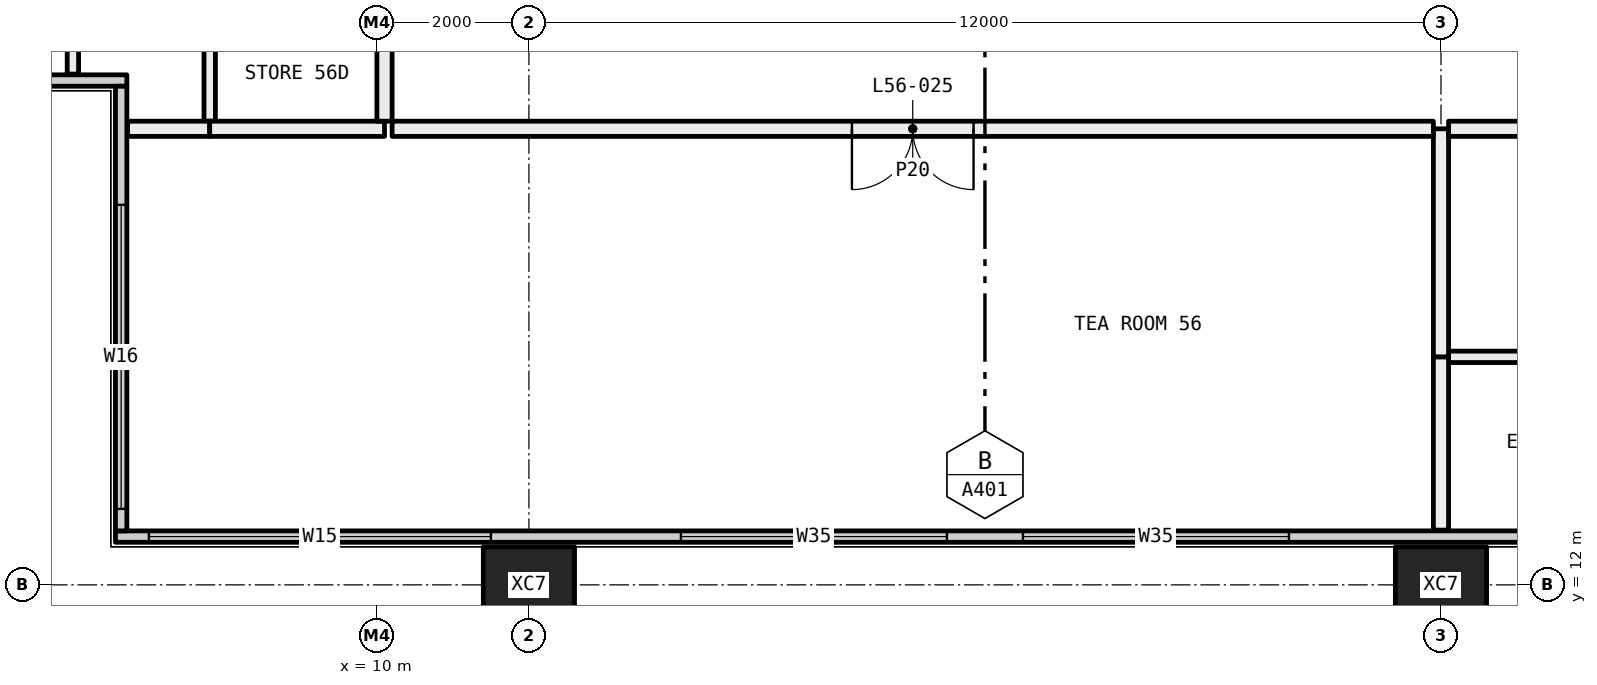
"""IFC4 building model, lengths in metres.
Left out: names, types, materials, properties, quantities, classifications, styles, units other than length and angle.
Written with IfcOpenShell. Run it as: python <this file> out.ifc"""

import sys

from ifc_helpers import new_model, si_unit, direction, frame, frame_2d, origin, origin_2d, place, context, subcontext, project, spatial, rectangle, hollow_rectangle, extrude, element, fill, save


model = new_model("IFC4")
c1 = context("Model", 3, precision=1e-05, world=origin(), true_north=direction((0.0, 1.0)))
c2 = subcontext(c1, "Body", "Model", "MODEL_VIEW")
j1 = project(units=[si_unit("LENGTHUNIT", "METRE"), si_unit("PLANEANGLEUNIT", "RADIAN")], contexts=[c1])
p1 = place(None, origin())
s1 = spatial("IfcSite", under=j1, at=p1, CompositionType="ELEMENT")
p2 = place(p1, origin())
s2 = spatial("IfcBuilding", under=s1, at=p2, CompositionType="ELEMENT")
p3 = place(p2, frame((0.0, 0.0, 210.0)))
s3 = spatial("IfcBuildingStorey", under=s2, at=p3, CompositionType="ELEMENT", Elevation=210.0)
for number, where, z_axis, x_axis in (
    (1, (12.0, 12.0, -0.4), (0.0, 0.0, 1.0), (1.0, 0.0, 0.0)),
    (2, (24.0, 12.0, -0.4), (0.0, 0.0, 1.0), (1.0, 0.0, 0.0)),
):
    element("IfcColumn", number, at=place(p3, frame(where, z_axis=z_axis, x_axis=x_axis)), inside=s3, PredefinedType="COLUMN", context=c2, shape_type="SweptSolid", body=[
        extrude(hollow_rectangle(XDim=1.2, YDim=1.0, WallThickness=0.045, at=origin_2d()), origin(), (0.0, 0.0, 1.0), 3.45),
    ])
p4 = place(p3, frame((6.56, 12.635, 0.0), z_axis=(0.0, 0.0, 1.0), x_axis=(1.0, 0.0, 0.0)))
e3 = element("IfcWall", 3, at=p4, inside=s3, PredefinedType="ELEMENTEDWALL", context=c2, shape_type="SweptSolid", body=[
    extrude(rectangle(XDim=46.88, YDim=0.15, at=frame_2d((23.44, 0.0))), origin(), (0.0, 0.0, 1.0), 3.05),
])
p5 = place(p4, frame((0.44, 0.0, 0.45)))
e4 = element("IfcOpeningElement", 4, at=p5, cuts=e3, PredefinedType="OPENING", context=c2, shape_type="SweptSolid", body=[
    extrude(rectangle(XDim=4.5, YDim=2.55, at=frame_2d((2.25, 1.275))), frame((0.0, 0.085, 0.0), z_axis=(0.0, -1.0, 0.0), x_axis=(1.0, 0.0, 0.0)), (0.0, 0.0, 1.0), 0.17),
])
p6 = place(p4, frame((7.44, 0.0, 0.45)))
e5 = element("IfcOpeningElement", 5, at=p6, cuts=e3, PredefinedType="OPENING", context=c2, shape_type="SweptSolid", body=[
    extrude(rectangle(XDim=3.5, YDim=2.55, at=frame_2d((1.75, 1.275))), frame((0.0, 0.085, 0.0), z_axis=(0.0, -1.0, 0.0), x_axis=(1.0, 0.0, 0.0)), (0.0, 0.0, 1.0), 0.17),
])
p7 = place(p4, frame((11.94, 0.0, 0.45)))
e6 = element("IfcOpeningElement", 6, at=p7, cuts=e3, PredefinedType="OPENING", context=c2, shape_type="SweptSolid", body=[
    extrude(rectangle(XDim=3.5, YDim=2.55, at=frame_2d((1.75, 1.275))), frame((0.0, 0.085, 0.0), z_axis=(0.0, -1.0, 0.0), x_axis=(1.0, 0.0, 0.0)), (0.0, 0.0, 1.0), 0.17),
])
p8 = place(p4, frame((19.44, 0.0, 0.45)))
e7 = element("IfcOpeningElement", 7, at=p8, cuts=e3, PredefinedType="OPENING", context=c2, shape_type="SweptSolid", body=[
    extrude(rectangle(XDim=3.5, YDim=2.55, at=frame_2d((1.75, 1.275))), frame((0.0, 0.085, 0.0), z_axis=(0.0, -1.0, 0.0), x_axis=(1.0, 0.0, 0.0)), (0.0, 0.0, 1.0), 0.17),
])
p9 = place(p4, frame((23.94, 0.0, 0.45)))
e8 = element("IfcOpeningElement", 8, at=p9, cuts=e3, PredefinedType="OPENING", context=c2, shape_type="SweptSolid", body=[
    extrude(rectangle(XDim=2.0, YDim=2.55, at=frame_2d((1.0, 1.275))), frame((0.0, 0.085, 0.0), z_axis=(0.0, -1.0, 0.0), x_axis=(1.0, 0.0, 0.0)), (0.0, 0.0, 1.0), 0.17),
])
p10 = place(p4, frame((31.44, 0.0, 0.45)))
e9 = element("IfcOpeningElement", 9, at=p10, cuts=e3, PredefinedType="OPENING", context=c2, shape_type="SweptSolid", body=[
    extrude(rectangle(XDim=3.5, YDim=2.55, at=frame_2d((1.75, 1.275))), frame((0.0, 0.085, 0.0), z_axis=(0.0, -1.0, 0.0), x_axis=(1.0, 0.0, 0.0)), (0.0, 0.0, 1.0), 0.17),
])
p11 = place(p4, frame((35.94, 0.0, 0.45)))
e10 = element("IfcOpeningElement", 10, at=p11, cuts=e3, PredefinedType="OPENING", context=c2, shape_type="SweptSolid", body=[
    extrude(rectangle(XDim=3.5, YDim=2.55, at=frame_2d((1.75, 1.275))), frame((0.0, 0.085, 0.0), z_axis=(0.0, -1.0, 0.0), x_axis=(1.0, 0.0, 0.0)), (0.0, 0.0, 1.0), 0.17),
])
p12 = place(p4, frame((41.94, 0.0, 0.45)))
e11 = element("IfcOpeningElement", 11, at=p12, cuts=e3, PredefinedType="OPENING", context=c2, shape_type="SweptSolid", body=[
    extrude(rectangle(XDim=4.5, YDim=2.55, at=frame_2d((2.25, 1.275))), frame((0.0, 0.085, 0.0), z_axis=(0.0, -1.0, 0.0), x_axis=(1.0, 0.0, 0.0)), (0.0, 0.0, 1.0), 0.17),
])
p13 = place(p3, frame((0.56, 18.635, 0.0), z_axis=(0.0, 0.0, 1.0), x_axis=(1.0, 0.0, 0.0)))
e12 = element("IfcWall", 12, at=p13, inside=s3, PredefinedType="ELEMENTEDWALL", context=c2, shape_type="SweptSolid", body=[
    extrude(rectangle(XDim=6.15, YDim=0.15, at=frame_2d((3.075, 0.0))), origin(), (0.0, 0.0, 1.0), 3.05),
])
p14 = place(p13, frame((0.44, 0.0, 0.45)))
e13 = element("IfcOpeningElement", 13, at=p14, cuts=e12, PredefinedType="OPENING", context=c2, shape_type="SweptSolid", body=[
    extrude(rectangle(XDim=4.0, YDim=2.55, at=frame_2d((2.0, 1.275))), frame((0.0, 0.085, 0.0), z_axis=(0.0, -1.0, 0.0), x_axis=(1.0, 0.0, 0.0)), (0.0, 0.0, 1.0), 0.17),
])
p15 = place(p3, frame((6.635, 12.71, 0.0), z_axis=(0.0, 0.0, 1.0), x_axis=(0.0, 1.0, 0.0)))
e14 = element("IfcWall", 14, at=p15, inside=s3, PredefinedType="ELEMENTEDWALL", context=c2, shape_type="SweptSolid", body=[
    extrude(rectangle(XDim=5.85, YDim=0.15, at=frame_2d((2.925, 0.0))), origin(), (0.0, 0.0, 1.0), 3.05),
])
p16 = place(p15, frame((0.29, 0.0, 0.45)))
e15 = element("IfcOpeningElement", 15, at=p16, cuts=e14, PredefinedType="OPENING", context=c2, shape_type="SweptSolid", body=[
    extrude(rectangle(XDim=4.0, YDim=2.55, at=frame_2d((2.0, 1.275))), frame((0.0, 0.085, 0.0), z_axis=(0.0, -1.0, 0.0), x_axis=(1.0, 0.0, 0.0)), (0.0, 0.0, 1.0), 0.17),
])
p17 = place(p3, frame((30.0, 15.0, 0.0), z_axis=(0.0, 0.0, 1.0), x_axis=(-1.0, 0.0, 0.0)))
e16 = element("IfcWall", 16, at=p17, inside=s3, PredefinedType="PARTITIONING", context=c2, shape_type="SweptSolid", body=[
    extrude(rectangle(XDim=5.9, YDim=0.15, at=frame_2d((2.95, 0.0))), origin(), (0.0, 0.0, 1.0), 3.05),
])
p18 = place(p3, frame((24.0, 15.0, 0.0), z_axis=(0.0, 0.0, 1.0), x_axis=(0.0, -1.0, 0.0)))
e17 = element("IfcWall", 17, at=p18, inside=s3, PredefinedType="PARTITIONING", context=c2, shape_type="SweptSolid", body=[
    extrude(rectangle(XDim=2.28, YDim=0.2, at=frame_2d((1.14, 0.0))), origin(), (0.0, 0.0, 1.0), 3.05),
])
p19 = place(p3, frame((24.0, 18.0, 0.0), z_axis=(0.0, 0.0, 1.0), x_axis=(0.0, -1.0, 0.0)))
e18 = element("IfcWall", 18, at=p19, inside=s3, PredefinedType="PARTITIONING", context=c2, shape_type="SweptSolid", body=[
    extrude(rectangle(XDim=3.0, YDim=0.2, at=frame_2d((1.5, 0.0))), origin(), (0.0, 0.0, 1.0), 3.05),
])
p20 = place(p3, frame((30.0, 18.0, 0.0), z_axis=(0.0, 0.0, 1.0), x_axis=(-1.0, 0.0, 0.0)))
e19 = element("IfcWall", 19, at=p20, inside=s3, PredefinedType="PARTITIONING", context=c2, shape_type="SweptSolid", body=[
    extrude(rectangle(XDim=5.9, YDim=0.2, at=frame_2d((2.95, 0.0))), origin(), (0.0, 0.0, 1.0), 3.05),
])
p21 = place(p3, frame((6.0, 18.72, 0.0), z_axis=(0.0, 0.0, 1.0), x_axis=(0.0, 1.0, 0.0)))
e20 = element("IfcWall", 20, at=p21, inside=s3, PredefinedType="PARTITIONING", context=c2, shape_type="SweptSolid", body=[
    extrude(rectangle(XDim=2.28, YDim=0.15, at=frame_2d((1.14, 0.0))), origin(), (0.0, 0.0, 1.0), 3.05),
])
p22 = place(p3, frame((7.8, 18.1, 0.0), z_axis=(0.0, 0.0, 1.0), x_axis=(0.0, 1.0, 0.0)))
e21 = element("IfcWall", 21, at=p22, inside=s3, PredefinedType="PARTITIONING", context=c2, shape_type="SweptSolid", body=[
    extrude(rectangle(XDim=2.9, YDim=0.15, at=frame_2d((1.45, 0.0))), origin(), (0.0, 0.0, 1.0), 3.05),
])
p23 = place(p3, frame((6.72, 18.0, 0.0), z_axis=(0.0, 0.0, 1.0), x_axis=(1.0, 0.0, 0.0)))
e22 = element("IfcWall", 22, at=p23, inside=s3, PredefinedType="PARTITIONING", context=c2, shape_type="SweptSolid", body=[
    extrude(rectangle(XDim=1.08, YDim=0.2, at=frame_2d((0.54, 0.0))), origin(), (0.0, 0.0, 1.0), 3.05),
])
p24 = place(p3, frame((7.8, 18.0, 0.0), z_axis=(0.0, 0.0, 1.0), x_axis=(1.0, 0.0, 0.0)))
e23 = element("IfcWall", 23, at=p24, inside=s3, PredefinedType="PARTITIONING", context=c2, shape_type="SweptSolid", body=[
    extrude(rectangle(XDim=2.3, YDim=0.2, at=frame_2d((1.15, 0.0))), origin(), (0.0, 0.0, 1.0), 3.05),
])
p25 = place(p3, frame((10.1, 18.1, 0.0), z_axis=(0.0, 0.0, 1.0), x_axis=(0.0, 1.0, 0.0)))
e24 = element("IfcWall", 24, at=p25, inside=s3, PredefinedType="PARTITIONING", context=c2, shape_type="SweptSolid", body=[
    extrude(rectangle(XDim=2.9, YDim=0.2, at=frame_2d((1.45, 0.0))), origin(), (0.0, 0.0, 1.0), 3.05),
])
p26 = place(p3, frame((23.9, 18.0, 0.0), z_axis=(0.0, 0.0, 1.0), x_axis=(-1.0, 0.0, 0.0)))
e25 = element("IfcWall", 25, at=p26, inside=s3, PredefinedType="PARTITIONING", context=c2, shape_type="SweptSolid", body=[
    extrude(rectangle(XDim=13.7, YDim=0.2, at=frame_2d((6.85, 0.0))), origin(), (0.0, 0.0, 1.0), 3.05),
])
p27 = place(p26, frame((6.05, 0.0, 0.0)))
e26 = element("IfcOpeningElement", 26, at=p27, cuts=e25, PredefinedType="OPENING", context=c2, shape_type="SweptSolid", body=[
    extrude(rectangle(XDim=1.6, YDim=2.1, at=frame_2d((0.8, 1.05))), frame((0.0, 0.11, 0.0), z_axis=(0.0, -1.0, 0.0), x_axis=(1.0, 0.0, 0.0)), (0.0, 0.0, 1.0), 0.22),
])
p28 = place(p5, origin())
e27 = element("IfcWindow", 27, at=p28, inside=s3, PartitioningType="SINGLE_PANEL", PredefinedType="WINDOW", context=c2, shape_type="SweptSolid", body=[
    extrude(rectangle(XDim=4.5, YDim=2.55, at=frame_2d((2.25, 1.275))), frame((0.0, 0.03, 0.0), z_axis=(0.0, -1.0, 0.0), x_axis=(1.0, 0.0, 0.0)), (0.0, 0.0, 1.0), 0.06),
])
fill(e4, e27)
p29 = place(p6, origin())
e28 = element("IfcWindow", 28, at=p29, inside=s3, PartitioningType="SINGLE_PANEL", PredefinedType="WINDOW", context=c2, shape_type="SweptSolid", body=[
    extrude(rectangle(XDim=3.5, YDim=2.55, at=frame_2d((1.75, 1.275))), frame((0.0, 0.03, 0.0), z_axis=(0.0, -1.0, 0.0), x_axis=(1.0, 0.0, 0.0)), (0.0, 0.0, 1.0), 0.06),
])
fill(e5, e28)
p30 = place(p7, origin())
e29 = element("IfcWindow", 29, at=p30, inside=s3, PartitioningType="SINGLE_PANEL", PredefinedType="WINDOW", context=c2, shape_type="SweptSolid", body=[
    extrude(rectangle(XDim=3.5, YDim=2.55, at=frame_2d((1.75, 1.275))), frame((0.0, 0.03, 0.0), z_axis=(0.0, -1.0, 0.0), x_axis=(1.0, 0.0, 0.0)), (0.0, 0.0, 1.0), 0.06),
])
fill(e6, e29)
p31 = place(p16, origin())
e30 = element("IfcWindow", 30, at=p31, inside=s3, PartitioningType="SINGLE_PANEL", PredefinedType="WINDOW", context=c2, shape_type="SweptSolid", body=[
    extrude(rectangle(XDim=4.0, YDim=2.55, at=frame_2d((2.0, 1.275))), frame((0.0, 0.03, 0.0), z_axis=(0.0, -1.0, 0.0), x_axis=(1.0, 0.0, 0.0)), (0.0, 0.0, 1.0), 0.06),
])
fill(e15, e30)
p32 = place(p27, origin())
e31 = element("IfcDoor", 31, at=p32, inside=s3, OperationType="DOUBLE_DOOR_SINGLE_SWING", PredefinedType="DOOR", context=c2, shape_type="SweptSolid", body=[
    extrude(rectangle(XDim=1.6, YDim=2.1, at=frame_2d((0.8, 1.05))), frame((0.0, 0.025, 0.0), z_axis=(0.0, -1.0, 0.0), x_axis=(1.0, 0.0, 0.0)), (0.0, 0.0, 1.0), 0.05),
])
fill(e26, e31)
save(model, sys.argv[1])
